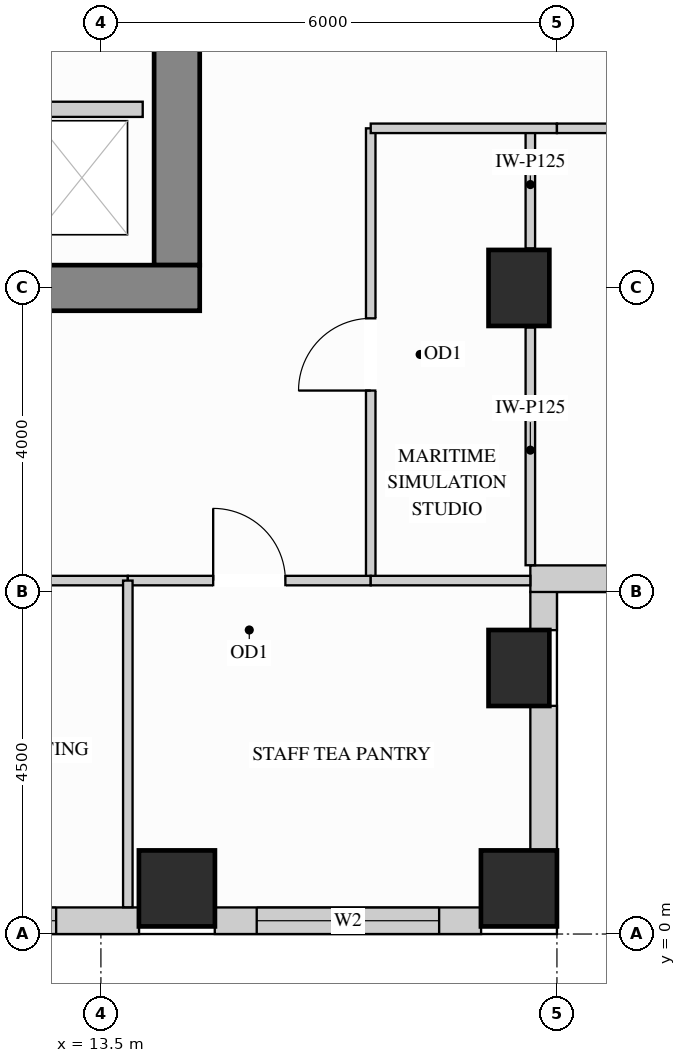
"""IFC4 building model, lengths in metres.
Left out: names, types, materials, properties, quantities, classifications, styles, units other than length and angle.
Written with IfcOpenShell. Run it as: python <this file> out.ifc"""

import sys

from ifc_helpers import new_model, si_unit, direction, frame, frame_2d, origin, origin_2d, place, context, subcontext, project, spatial, rectangle, extrude, source, transform, mapped, element, fill, save


model = new_model("IFC4")
c1 = context("Model", 3, precision=1e-05, world=origin(), true_north=direction((0.0, 1.0)))
c2 = subcontext(c1, "Body", "Model", "MODEL_VIEW")
j1 = project(units=[si_unit("LENGTHUNIT", "METRE"), si_unit("PLANEANGLEUNIT", "RADIAN")], contexts=[c1])
p1 = place(None, origin())
s1 = spatial("IfcSite", under=j1, at=p1, CompositionType="ELEMENT")
p2 = place(p1, origin())
s2 = spatial("IfcBuilding", under=s1, at=p2, CompositionType="ELEMENT")
p3 = place(p2, frame((0.0, 0.0, 143.1)))
s3 = spatial("IfcBuildingStorey", under=s2, at=p3, CompositionType="ELEMENT", Elevation=143.1)
m1 = source(origin(), c2, "Body", "SweptSolid", [
    extrude(rectangle(XDim=0.8, YDim=1.0, at=origin_2d()), origin(), (0.0, 0.0, 1.0), 3.4),
])
for number, where, z_axis, x_axis in (
    (1, (19.0, 3.5, 0.0), (0.0, 0.0, 1.0), (1.0, 0.0, 0.0)),
    (2, (19.0, 8.5, 0.0), (0.0, 0.0, 1.0), (1.0, 0.0, 0.0)),
):
    element("IfcColumn", number, at=place(p3, frame(where, z_axis=z_axis, x_axis=x_axis)), inside=s3, PredefinedType="COLUMN", context=c2, shape_type="MappedRepresentation", body=[
        mapped(m1, transform((0.0, 0.0, 0.0), x_axis=(1.0, 0.0, 0.0), y_axis=(0.0, 1.0, 0.0), z_axis=(0.0, 0.0, 1.0))),
    ])
m2 = source(origin(), c2, "Body", "SweptSolid", [
    extrude(rectangle(XDim=1.0, YDim=1.0, at=origin_2d()), origin(), (0.0, 0.0, 1.0), 3.4),
])
for number, where, z_axis, x_axis in (
    (3, (14.5, 0.6, 0.0), (0.0, 0.0, 1.0), (1.0, 0.0, 0.0)),
    (4, (19.0, 0.6, 0.0), (0.0, 0.0, 1.0), (1.0, 0.0, 0.0)),
):
    element("IfcColumn", number, at=place(p3, frame(where, z_axis=z_axis, x_axis=x_axis)), inside=s3, PredefinedType="COLUMN", context=c2, shape_type="MappedRepresentation", body=[
        mapped(m2, transform((0.0, 0.0, 0.0), x_axis=(1.0, 0.0, 0.0), y_axis=(0.0, 1.0, 0.0), z_axis=(0.0, 0.0, 1.0))),
    ])
m3 = source(origin(), c2, "Body", "SweptSolid", [
    extrude(rectangle(XDim=10.02, YDim=0.6, at=frame_2d((5.01, 0.0))), origin(), (0.0, 0.0, 1.0), 3.4),
])
p4 = place(p3, frame((14.5, 8.8, 0.0), z_axis=(0.0, 0.0, 1.0), x_axis=(0.0, 1.0, 0.0)))
e5 = element("IfcWall", 5, at=p4, inside=s3, PredefinedType="SHEAR", context=c2, shape_type="MappedRepresentation", body=[
    mapped(m3, transform((0.0, 0.0, 0.0), x_axis=(1.0, 0.0, 0.0), y_axis=(0.0, 1.0, 0.0), z_axis=(0.0, 0.0, 1.0))),
])
m4 = source(origin(), c2, "Body", "SweptSolid", [
    extrude(rectangle(XDim=10.6, YDim=0.6, at=frame_2d((5.3, 0.0))), origin(), (0.0, 0.0, 1.0), 3.4),
])
p5 = place(p3, frame((4.2, 8.5, 0.0), z_axis=(0.0, 0.0, 1.0), x_axis=(1.0, 0.0, 0.0)))
e6 = element("IfcWall", 6, at=p5, inside=s3, PredefinedType="SHEAR", context=c2, shape_type="MappedRepresentation", body=[
    mapped(m4, transform((0.0, 0.0, 0.0), x_axis=(1.0, 0.0, 0.0), y_axis=(0.0, 1.0, 0.0), z_axis=(0.0, 0.0, 1.0))),
])
p6 = place(p3, frame((9.498, 0.175, 0.0), z_axis=(0.0, 0.0, 1.0), x_axis=(1.0, 0.0, 0.0)))
e7 = element("IfcWall", 7, at=p6, inside=s3, PredefinedType="SOLIDWALL", context=c2, shape_type="SweptSolid", body=[
    extrude(rectangle(XDim=4.504, YDim=0.35, at=frame_2d((2.252, 0.0))), origin(), (0.0, 0.0, 1.0), 2.612),
])
p7 = place(p6, frame((1.013, 0.0, 0.78)))
e8 = element("IfcOpeningElement", 8, at=p7, cuts=e7, PredefinedType="OPENING", context=c2, shape_type="SweptSolid", body=[
    extrude(rectangle(XDim=2.4, YDim=1.652, at=frame_2d((1.2, 0.826))), frame((0.0, 0.185, 0.0), z_axis=(0.0, -1.0, 0.0), x_axis=(1.0, 0.0, 0.0)), (0.0, 0.0, 1.0), 0.37),
])
p8 = place(p3, frame((14.998, 0.175, 0.0), z_axis=(0.0, 0.0, 1.0), x_axis=(1.0, 0.0, 0.0)))
e9 = element("IfcWall", 9, at=p8, inside=s3, PredefinedType="SOLIDWALL", context=c2, shape_type="SweptSolid", body=[
    extrude(rectangle(XDim=3.504, YDim=0.35, at=frame_2d((1.752, 0.0))), origin(), (0.0, 0.0, 1.0), 2.612),
])
p9 = place(p8, frame((0.552, 0.0, 0.78)))
e10 = element("IfcOpeningElement", 10, at=p9, cuts=e9, PredefinedType="OPENING", context=c2, shape_type="SweptSolid", body=[
    extrude(rectangle(XDim=2.4, YDim=1.652, at=frame_2d((1.2, 0.826))), frame((0.0, 0.185, 0.0), z_axis=(0.0, -1.0, 0.0), x_axis=(1.0, 0.0, 0.0)), (0.0, 0.0, 1.0), 0.37),
])
m5 = source(origin(), c2, "Body", "SweptSolid", [
    extrude(rectangle(XDim=1.904, YDim=0.35, at=frame_2d((0.952, 0.0))), origin(), (0.0, 0.0, 1.0), 2.612),
])
p10 = place(p3, frame((19.325, 1.098, 0.0), z_axis=(0.0, 0.0, 1.0), x_axis=(0.0, 1.0, 0.0)))
e11 = element("IfcWall", 11, at=p10, inside=s3, PredefinedType="SOLIDWALL", context=c2, shape_type="MappedRepresentation", body=[
    mapped(m5, transform((0.0, 0.0, 0.0), x_axis=(1.0, 0.0, 0.0), y_axis=(0.0, 1.0, 0.0), z_axis=(0.0, 0.0, 1.0))),
])
m6 = source(origin(), c2, "Body", "SweptSolid", [
    extrude(rectangle(XDim=0.504, YDim=0.35, at=frame_2d((0.252, 0.0))), origin(), (0.0, 0.0, 1.0), 2.773),
])
p11 = place(p3, frame((19.325, 3.998, 0.0), z_axis=(0.0, 0.0, 1.0), x_axis=(0.0, 1.0, 0.0)))
e12 = element("IfcWall", 12, at=p11, inside=s3, PredefinedType="SOLIDWALL", context=c2, shape_type="MappedRepresentation", body=[
    mapped(m6, transform((0.0, 0.0, 0.0), x_axis=(1.0, 0.0, 0.0), y_axis=(0.0, 1.0, 0.0), z_axis=(0.0, 0.0, 1.0))),
])
p12 = place(p3, frame((19.15, 4.675, 0.0), z_axis=(0.0, 0.0, 1.0), x_axis=(1.0, 0.0, 0.0)))
e13 = element("IfcWall", 13, at=p12, inside=s3, PredefinedType="SOLIDWALL", context=c2, shape_type="SweptSolid", body=[
    extrude(rectangle(XDim=15.6, YDim=0.35, at=frame_2d((7.8, 0.0))), origin(), (0.0, 0.0, 1.0), 3.385),
])
p13 = place(p12, frame((4.307, 0.0, 0.78)))
e14 = element("IfcOpeningElement", 14, at=p13, cuts=e13, PredefinedType="OPENING", context=c2, shape_type="SweptSolid", body=[
    extrude(rectangle(XDim=1.5, YDim=2.0, at=frame_2d((0.75, 1.0))), frame((0.0, 0.185, 0.0), z_axis=(0.0, -1.0, 0.0), x_axis=(1.0, 0.0, 0.0)), (0.0, 0.0, 1.0), 0.37),
])
p14 = place(p12, frame((9.793, 0.0, 0.78)))
e15 = element("IfcOpeningElement", 15, at=p14, cuts=e13, PredefinedType="OPENING", context=c2, shape_type="SweptSolid", body=[
    extrude(rectangle(XDim=1.5, YDim=2.0, at=frame_2d((0.75, 1.0))), frame((0.0, 0.185, 0.0), z_axis=(0.0, -1.0, 0.0), x_axis=(1.0, 0.0, 0.0)), (0.0, 0.0, 1.0), 0.37),
])
m7 = source(origin(), c2, "Body", "SweptSolid", [
    extrude(rectangle(XDim=3.128, YDim=0.125, at=frame_2d((1.564, 0.0))), origin(), (0.0, 0.0, 1.0), 2.773),
])
p15 = place(p3, frame((19.15, 4.852, 0.0), z_axis=(0.0, 0.0, 1.0), x_axis=(0.0, 1.0, 0.0)))
e16 = element("IfcWall", 16, at=p15, inside=s3, PredefinedType="PARTITIONING", context=c2, shape_type="MappedRepresentation", body=[
    mapped(m7, transform((0.0, 0.0, 0.0), x_axis=(1.0, 0.0, 0.0), y_axis=(0.0, 1.0, 0.0), z_axis=(0.0, 0.0, 1.0))),
])
m8 = source(origin(), c2, "Body", "SweptSolid", [
    extrude(rectangle(XDim=1.58, YDim=0.125, at=frame_2d((0.79, 0.0))), origin(), (0.0, 0.0, 1.0), 2.773),
])
p16 = place(p3, frame((19.15, 9.02, 0.0), z_axis=(0.0, 0.0, 1.0), x_axis=(0.0, 1.0, 0.0)))
e17 = element("IfcWall", 17, at=p16, inside=s3, PredefinedType="PARTITIONING", context=c2, shape_type="MappedRepresentation", body=[
    mapped(m8, transform((0.0, 0.0, 0.0), x_axis=(1.0, 0.0, 0.0), y_axis=(0.0, 1.0, 0.0), z_axis=(0.0, 0.0, 1.0))),
])
p17 = place(p3, frame((17.05, 4.65, 0.0), z_axis=(0.0, 0.0, 1.0), x_axis=(0.0, 1.0, 0.0)))
e18 = element("IfcWall", 18, at=p17, inside=s3, PredefinedType="PARTITIONING", context=c2, shape_type="SweptSolid", body=[
    extrude(rectangle(XDim=5.95, YDim=0.125, at=frame_2d((2.975, 0.0))), origin(), (0.0, 0.0, 1.0), 3.385),
])
p18 = place(p17, frame((2.5, 0.0, 0.0)))
e19 = element("IfcOpeningElement", 19, at=p18, cuts=e18, PredefinedType="OPENING", context=c2, shape_type="SweptSolid", body=[
    extrude(rectangle(XDim=0.95, YDim=2.15, at=frame_2d((0.475, 1.075))), frame((0.0, 0.073, 0.0), z_axis=(0.0, -1.0, 0.0), x_axis=(1.0, 0.0, 0.0)), (0.0, 0.0, 1.0), 0.145),
])
m9 = source(origin(), c2, "Body", "SweptSolid", [
    extrude(rectangle(XDim=2.45, YDim=0.125, at=frame_2d((1.225, 0.0))), origin(), (0.0, 0.0, 1.0), 3.385),
])
p19 = place(p3, frame((17.05, 10.6, 0.0), z_axis=(0.0, 0.0, 1.0), x_axis=(1.0, 0.0, 0.0)))
e20 = element("IfcWall", 20, at=p19, inside=s3, PredefinedType="PARTITIONING", context=c2, shape_type="MappedRepresentation", body=[
    mapped(m9, transform((0.0, 0.0, 0.0), x_axis=(1.0, 0.0, 0.0), y_axis=(0.0, 1.0, 0.0), z_axis=(0.0, 0.0, 1.0))),
])
p20 = place(p3, frame((19.5, 10.6, 0.0), z_axis=(0.0, 0.0, 1.0), x_axis=(1.0, 0.0, 0.0)))
e21 = element("IfcWall", 21, at=p20, inside=s3, PredefinedType="PARTITIONING", context=c2, shape_type="SweptSolid", body=[
    extrude(rectangle(XDim=14.9, YDim=0.125, at=frame_2d((7.45, 0.0))), origin(), (0.0, 0.0, 1.0), 3.385),
])
p21 = place(p20, frame((6.975, 0.0, 0.0)))
e22 = element("IfcOpeningElement", 22, at=p21, cuts=e21, PredefinedType="OPENING", context=c2, shape_type="SweptSolid", body=[
    extrude(rectangle(XDim=0.95, YDim=2.15, at=frame_2d((0.475, 1.075))), frame((0.0, 0.073, 0.0), z_axis=(0.0, -1.0, 0.0), x_axis=(1.0, 0.0, 0.0)), (0.0, 0.0, 1.0), 0.145),
])
p22 = place(p3, frame((8.061, 4.65, 0.0), z_axis=(0.0, 0.0, 1.0), x_axis=(1.0, 0.0, 0.0)))
e23 = element("IfcWall", 23, at=p22, inside=s3, PredefinedType="PARTITIONING", context=c2, shape_type="SweptSolid", body=[
    extrude(rectangle(XDim=5.793, YDim=0.125, at=frame_2d((2.896, 0.0))), origin(), (0.0, 0.0, 1.0), 2.848),
])
p23 = place(p22, frame((2.421, 0.0, 0.0)))
e24 = element("IfcOpeningElement", 24, at=p23, cuts=e23, PredefinedType="OPENING", context=c2, shape_type="SweptSolid", body=[
    extrude(rectangle(XDim=0.95, YDim=2.15, at=frame_2d((0.475, 1.075))), frame((0.0, 0.073, 0.0), z_axis=(0.0, -1.0, 0.0), x_axis=(1.0, 0.0, 0.0)), (0.0, 0.0, 1.0), 0.145),
])
p24 = place(p3, frame((13.854, 4.65, 0.0), z_axis=(0.0, 0.0, 1.0), x_axis=(1.0, 0.0, 0.0)))
e25 = element("IfcWall", 25, at=p24, inside=s3, PredefinedType="PARTITIONING", context=c2, shape_type="SweptSolid", body=[
    extrude(rectangle(XDim=3.196, YDim=0.125, at=frame_2d((1.598, 0.0))), origin(), (0.0, 0.0, 1.0), 2.848),
])
p25 = place(p24, frame((1.123, 0.0, 0.0)))
e26 = element("IfcOpeningElement", 26, at=p25, cuts=e25, PredefinedType="OPENING", context=c2, shape_type="SweptSolid", body=[
    extrude(rectangle(XDim=0.95, YDim=2.15, at=frame_2d((0.475, 1.075))), frame((0.0, 0.073, 0.0), z_axis=(0.0, -1.0, 0.0), x_axis=(1.0, 0.0, 0.0)), (0.0, 0.0, 1.0), 0.145),
])
m10 = source(origin(), c2, "Body", "SweptSolid", [
    extrude(rectangle(XDim=2.1, YDim=0.125, at=frame_2d((1.05, 0.0))), origin(), (0.0, 0.0, 1.0), 2.848),
])
p26 = place(p3, frame((17.05, 4.65, 0.0), z_axis=(0.0, 0.0, 1.0), x_axis=(1.0, 0.0, 0.0)))
e27 = element("IfcWall", 27, at=p26, inside=s3, PredefinedType="PARTITIONING", context=c2, shape_type="MappedRepresentation", body=[
    mapped(m10, transform((0.0, 0.0, 0.0), x_axis=(1.0, 0.0, 0.0), y_axis=(0.0, 1.0, 0.0), z_axis=(0.0, 0.0, 1.0))),
])
m11 = source(origin(), c2, "Body", "SweptSolid", [
    extrude(rectangle(XDim=4.298, YDim=0.125, at=frame_2d((2.149, 0.0))), origin(), (0.0, 0.0, 1.0), 3.385),
])
p27 = place(p3, frame((13.854, 0.352, 0.0), z_axis=(0.0, 0.0, 1.0), x_axis=(0.0, 1.0, 0.0)))
e28 = element("IfcWall", 28, at=p27, inside=s3, PredefinedType="PARTITIONING", context=c2, shape_type="MappedRepresentation", body=[
    mapped(m11, transform((0.0, 0.0, 0.0), x_axis=(1.0, 0.0, 0.0), y_axis=(0.0, 1.0, 0.0), z_axis=(0.0, 0.0, 1.0))),
])
m12 = source(origin(), c2, "Body", "SweptSolid", [
    extrude(rectangle(XDim=1.63, YDim=0.2, at=frame_2d((0.815, 0.0))), origin(), (0.0, 0.0, 1.0), 3.385),
])
p28 = place(p3, frame((12.42, 10.85, 0.0), z_axis=(0.0, 0.0, 1.0), x_axis=(1.0, 0.0, 0.0)))
e29 = element("IfcWall", 29, at=p28, inside=s3, PredefinedType="PARTITIONING", context=c2, shape_type="MappedRepresentation", body=[
    mapped(m12, transform((0.0, 0.0, 0.0), x_axis=(1.0, 0.0, 0.0), y_axis=(0.0, 1.0, 0.0), z_axis=(0.0, 0.0, 1.0))),
])
m13 = source(origin(), c2, "Body", "SweptSolid", [
    extrude(rectangle(XDim=0.95, YDim=2.15, at=frame_2d((0.475, 1.075))), frame((0.0, 0.025, 0.0), z_axis=(0.0, -1.0, 0.0), x_axis=(1.0, 0.0, 0.0)), (0.0, 0.0, 1.0), 0.05),
])
p29 = place(p18, origin())
e30 = element("IfcDoor", 30, at=p29, inside=s3, OperationType="SINGLE_SWING_LEFT", PredefinedType="DOOR", context=c2, shape_type="MappedRepresentation", body=[
    mapped(m13, transform((0.0, 0.0, 0.0), x_axis=(1.0, 0.0, 0.0), y_axis=(0.0, 1.0, 0.0), z_axis=(0.0, 0.0, 1.0))),
])
fill(e19, e30)
p30 = place(p25, origin())
e31 = element("IfcDoor", 31, at=p30, inside=s3, OperationType="SINGLE_SWING_LEFT", PredefinedType="DOOR", context=c2, shape_type="MappedRepresentation", body=[
    mapped(m13, transform((0.0, 0.0, 0.0), x_axis=(1.0, 0.0, 0.0), y_axis=(0.0, 1.0, 0.0), z_axis=(0.0, 0.0, 1.0))),
])
fill(e26, e31)
m14 = source(origin(), c2, "Body", "SweptSolid", [
    extrude(rectangle(XDim=2.4, YDim=1.652, at=frame_2d((1.2, 0.826))), frame((0.0, 0.03, 0.0), z_axis=(0.0, -1.0, 0.0), x_axis=(1.0, 0.0, 0.0)), (0.0, 0.0, 1.0), 0.06),
])
p31 = place(p7, origin())
e32 = element("IfcWindow", 32, at=p31, inside=s3, PartitioningType="SINGLE_PANEL", PredefinedType="WINDOW", context=c2, shape_type="MappedRepresentation", body=[
    mapped(m14, transform((0.0, 0.0, 0.0), x_axis=(1.0, 0.0, 0.0), y_axis=(0.0, 1.0, 0.0), z_axis=(0.0, 0.0, 1.0))),
])
fill(e8, e32)
p32 = place(p9, origin())
e33 = element("IfcWindow", 33, at=p32, inside=s3, PartitioningType="SINGLE_PANEL", PredefinedType="WINDOW", context=c2, shape_type="MappedRepresentation", body=[
    mapped(m14, transform((0.0, 0.0, 0.0), x_axis=(1.0, 0.0, 0.0), y_axis=(0.0, 1.0, 0.0), z_axis=(0.0, 0.0, 1.0))),
])
fill(e10, e33)
save(model, sys.argv[1])
